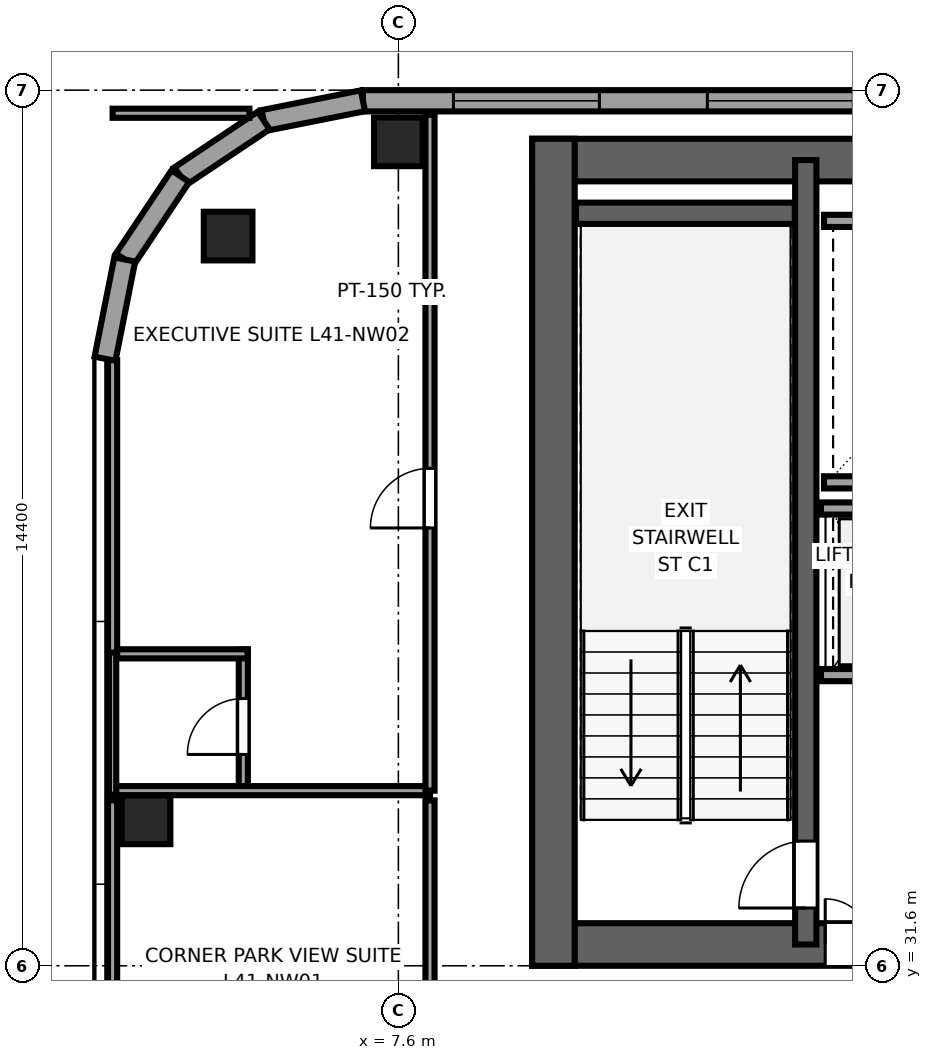
"""IFC4 building model, lengths in metres.
Left out: names, types, materials, properties, quantities, classifications, styles, units other than length and angle.
Written with IfcOpenShell. Run it as: python <this file> out.ifc"""

import sys

from ifc_helpers import new_model, si_unit, direction, frame, frame_2d, origin, origin_2d, place, context, subcontext, project, spatial, rectangle, extrude, source, transform, mapped, element, fill, save


model = new_model("IFC4")
c1 = context("Model", 3, precision=1e-05, world=origin(), true_north=direction((0.0, 1.0)))
c2 = subcontext(c1, "Body", "Model", "MODEL_VIEW")
j1 = project(units=[si_unit("LENGTHUNIT", "METRE"), si_unit("PLANEANGLEUNIT", "RADIAN")], contexts=[c1])
p1 = place(None, origin())
s1 = spatial("IfcSite", under=j1, at=p1, CompositionType="ELEMENT")
p2 = place(p1, origin())
s2 = spatial("IfcBuilding", under=s1, at=p2, CompositionType="ELEMENT")
p3 = place(p2, frame((0.0, 0.0, 157.7)))
s3 = spatial("IfcBuildingStorey", under=s2, at=p3, CompositionType="ELEMENT", Elevation=157.7)
p4 = place(p3, frame((9.8, 31.95, 0.0), z_axis=(0.0, 0.0, 1.0), x_axis=(1.0, 0.0, 0.0)))
e1 = element("IfcWall", 1, at=p4, inside=s3, PredefinedType="SHEAR", context=c2, shape_type="SweptSolid", body=[
    extrude(rectangle(XDim=26.4, YDim=0.7, at=frame_2d((13.2, 0.0))), origin(), (0.0, 0.0, 1.0), 3.55),
])
p5 = place(p4, frame((6.32, 0.0, 0.0), z_axis=(0.0, 0.0, 1.0), x_axis=(-1.0, 0.0, 0.0)))
e2 = element("IfcOpeningElement", 2, at=p5, cuts=e1, PredefinedType="OPENING", context=c2, shape_type="SweptSolid", body=[
    extrude(rectangle(XDim=1.5, YDim=2.04, at=frame_2d((0.75, 1.02))), frame((0.0, 0.36, 0.0), z_axis=(0.0, -1.0, 0.0), x_axis=(1.0, 0.0, 0.0)), (0.0, 0.0, 1.0), 0.72),
])
p6 = place(p4, frame((13.95, 0.0, 0.0), z_axis=(0.0, 0.0, 1.0), x_axis=(-1.0, 0.0, 0.0)))
e3 = element("IfcOpeningElement", 3, at=p6, cuts=e1, PredefinedType="OPENING", context=c2, shape_type="SweptSolid", body=[
    extrude(rectangle(XDim=1.5, YDim=2.04, at=frame_2d((0.75, 1.02))), frame((0.0, 0.36, 0.0), z_axis=(0.0, -1.0, 0.0), x_axis=(1.0, 0.0, 0.0)), (0.0, 0.0, 1.0), 0.72),
])
p7 = place(p4, frame((21.58, 0.0, 0.0), z_axis=(0.0, 0.0, 1.0), x_axis=(-1.0, 0.0, 0.0)))
e4 = element("IfcOpeningElement", 4, at=p7, cuts=e1, PredefinedType="OPENING", context=c2, shape_type="SweptSolid", body=[
    extrude(rectangle(XDim=1.5, YDim=2.04, at=frame_2d((0.75, 1.02))), frame((0.0, 0.36, 0.0), z_axis=(0.0, -1.0, 0.0), x_axis=(1.0, 0.0, 0.0)), (0.0, 0.0, 1.0), 0.72),
])
p8 = place(p4, frame((8.37, 0.0, 0.0), z_axis=(0.0, 0.0, 1.0), x_axis=(-1.0, 0.0, 0.0)))
e5 = element("IfcOpeningElement", 5, at=p8, cuts=e1, PredefinedType="OPENING", context=c2, shape_type="SweptSolid", body=[
    extrude(rectangle(XDim=0.82, YDim=2.01, at=frame_2d((0.41, 1.005))), frame((0.0, 0.36, 0.0), z_axis=(0.0, -1.0, 0.0), x_axis=(1.0, 0.0, 0.0)), (0.0, 0.0, 1.0), 0.72),
])
p9 = place(p4, frame((18.87, 0.0, 0.0), z_axis=(0.0, 0.0, 1.0), x_axis=(-1.0, 0.0, 0.0)))
e6 = element("IfcOpeningElement", 6, at=p9, cuts=e1, PredefinedType="OPENING", context=c2, shape_type="SweptSolid", body=[
    extrude(rectangle(XDim=0.82, YDim=2.01, at=frame_2d((0.41, 1.005))), frame((0.0, 0.36, 0.0), z_axis=(0.0, -1.0, 0.0), x_axis=(1.0, 0.0, 0.0)), (0.0, 0.0, 1.0), 0.72),
])
p10 = place(p3, frame((9.8, 44.85, 0.0), z_axis=(0.0, 0.0, 1.0), x_axis=(1.0, 0.0, 0.0)))
e7 = element("IfcWall", 7, at=p10, inside=s3, PredefinedType="SHEAR", context=c2, shape_type="SweptSolid", body=[
    extrude(rectangle(XDim=26.4, YDim=0.7, at=frame_2d((13.2, 0.0))), origin(), (0.0, 0.0, 1.0), 3.55),
])
p11 = place(p3, frame((10.15, 31.6, 0.0), z_axis=(0.0, 0.0, 1.0), x_axis=(0.0, 1.0, 0.0)))
e8 = element("IfcWall", 8, at=p11, inside=s3, PredefinedType="SHEAR", context=c2, shape_type="SweptSolid", body=[
    extrude(rectangle(XDim=13.6, YDim=0.7, at=frame_2d((6.8, 0.0))), origin(), (0.0, 0.0, 1.0), 3.55),
])
p12 = place(p3, frame((14.3, 31.95, 0.0), z_axis=(0.0, 0.0, 1.0), x_axis=(0.0, 1.0, 0.0)))
e9 = element("IfcWall", 9, at=p12, inside=s3, PredefinedType="SHEAR", context=c2, shape_type="SweptSolid", body=[
    extrude(rectangle(XDim=12.9, YDim=0.35, at=frame_2d((6.45, 0.0))), origin(), (0.0, 0.0, 1.0), 3.55),
])
p13 = place(p12, frame((0.6, 0.0, 0.0)))
e10 = element("IfcOpeningElement", 10, at=p13, cuts=e9, PredefinedType="OPENING", context=c2, shape_type="SweptSolid", body=[
    extrude(rectangle(XDim=1.1, YDim=2.12, at=frame_2d((0.55, 1.06))), frame((0.0, 0.185, 0.0), z_axis=(0.0, -1.0, 0.0), x_axis=(1.0, 0.0, 0.0)), (0.0, 0.0, 1.0), 0.37),
])
p14 = place(p3, frame((10.52, 43.975, 0.0), z_axis=(0.0, 0.0, 1.0), x_axis=(1.0, 0.0, 0.0)))
e11 = element("IfcWall", 11, at=p14, inside=s3, PredefinedType="SHEAR", context=c2, shape_type="SweptSolid", body=[
    extrude(rectangle(XDim=3.6, YDim=0.35, at=frame_2d((1.8, 0.0))), origin(), (0.0, 0.0, 1.0), 3.55),
])
m1 = source(origin(), c2, "Body", "SweptSolid", [
    extrude(rectangle(XDim=0.8, YDim=0.8, at=origin_2d()), origin(), (0.0, 0.0, 1.0), 3.55),
])
for number, where, z_axis, x_axis in (
    (12, (4.8, 43.6, 0.0), (0.0, 0.0, 1.0), (1.0, 0.0, 0.0)),
    (13, (7.6, 45.15, 0.0), (0.0, 0.0, 1.0), (1.0, 0.0, 0.0)),
    (14, (3.45, 34.0, 0.0), (0.0, 0.0, 1.0), (1.0, 0.0, 0.0)),
):
    element("IfcColumn", number, at=place(p3, frame(where, z_axis=z_axis, x_axis=x_axis)), inside=s3, PredefinedType="COLUMN", context=c2, shape_type="MappedRepresentation", body=[
        mapped(m1, transform((0.0, 0.0, 0.0), x_axis=(1.0, 0.0, 0.0), y_axis=(0.0, 1.0, 0.0), z_axis=(0.0, 0.0, 1.0), scale=1.0)),
    ])
p15 = place(p3, frame((49.983, 45.825, 0.0), z_axis=(0.0, 0.0, 1.0), x_axis=(-1.0, 0.0, 0.0)))
e15 = element("IfcWall", 15, at=p15, inside=s3, PredefinedType="SOLIDWALL", context=c2, shape_type="SweptSolid", body=[
    extrude(rectangle(XDim=42.966, YDim=0.35, at=frame_2d((21.483, 0.0))), origin(), (0.0, 0.0, 1.0), 3.37),
])
p16 = place(p15, frame((1.488, 0.0, 0.68)))
e16 = element("IfcOpeningElement", 16, at=p16, cuts=e15, PredefinedType="OPENING", context=c2, shape_type="SweptSolid", body=[
    extrude(rectangle(XDim=2.4, YDim=1.9, at=frame_2d((1.2, 0.95))), frame((0.0, 0.185, 0.0), z_axis=(0.0, -1.0, 0.0), x_axis=(1.0, 0.0, 0.0)), (0.0, 0.0, 1.0), 0.37),
])
p17 = place(p15, frame((9.841, 0.0, 0.68)))
e17 = element("IfcOpeningElement", 17, at=p17, cuts=e15, PredefinedType="OPENING", context=c2, shape_type="SweptSolid", body=[
    extrude(rectangle(XDim=2.4, YDim=1.9, at=frame_2d((1.2, 0.95))), frame((0.0, 0.185, 0.0), z_axis=(0.0, -1.0, 0.0), x_axis=(1.0, 0.0, 0.0)), (0.0, 0.0, 1.0), 0.37),
])
p18 = place(p15, frame((14.018, 0.0, 0.68)))
e18 = element("IfcOpeningElement", 18, at=p18, cuts=e15, PredefinedType="OPENING", context=c2, shape_type="SweptSolid", body=[
    extrude(rectangle(XDim=2.4, YDim=1.9, at=frame_2d((1.2, 0.95))), frame((0.0, 0.185, 0.0), z_axis=(0.0, -1.0, 0.0), x_axis=(1.0, 0.0, 0.0)), (0.0, 0.0, 1.0), 0.37),
])
p19 = place(p15, frame((18.195, 0.0, 0.68)))
e19 = element("IfcOpeningElement", 19, at=p19, cuts=e15, PredefinedType="OPENING", context=c2, shape_type="SweptSolid", body=[
    extrude(rectangle(XDim=2.4, YDim=1.9, at=frame_2d((1.2, 0.95))), frame((0.0, 0.185, 0.0), z_axis=(0.0, -1.0, 0.0), x_axis=(1.0, 0.0, 0.0)), (0.0, 0.0, 1.0), 0.37),
])
p20 = place(p15, frame((22.371, 0.0, 0.68)))
e20 = element("IfcOpeningElement", 20, at=p20, cuts=e15, PredefinedType="OPENING", context=c2, shape_type="SweptSolid", body=[
    extrude(rectangle(XDim=2.4, YDim=1.9, at=frame_2d((1.2, 0.95))), frame((0.0, 0.185, 0.0), z_axis=(0.0, -1.0, 0.0), x_axis=(1.0, 0.0, 0.0)), (0.0, 0.0, 1.0), 0.37),
])
p21 = place(p15, frame((26.548, 0.0, 0.68)))
e21 = element("IfcOpeningElement", 21, at=p21, cuts=e15, PredefinedType="OPENING", context=c2, shape_type="SweptSolid", body=[
    extrude(rectangle(XDim=2.4, YDim=1.9, at=frame_2d((1.2, 0.95))), frame((0.0, 0.185, 0.0), z_axis=(0.0, -1.0, 0.0), x_axis=(1.0, 0.0, 0.0)), (0.0, 0.0, 1.0), 0.37),
])
p22 = place(p15, frame((30.724, 0.0, 0.68)))
e22 = element("IfcOpeningElement", 22, at=p22, cuts=e15, PredefinedType="OPENING", context=c2, shape_type="SweptSolid", body=[
    extrude(rectangle(XDim=2.4, YDim=1.9, at=frame_2d((1.2, 0.95))), frame((0.0, 0.185, 0.0), z_axis=(0.0, -1.0, 0.0), x_axis=(1.0, 0.0, 0.0)), (0.0, 0.0, 1.0), 0.37),
])
p23 = place(p15, frame((34.901, 0.0, 0.68)))
e23 = element("IfcOpeningElement", 23, at=p23, cuts=e15, PredefinedType="OPENING", context=c2, shape_type="SweptSolid", body=[
    extrude(rectangle(XDim=2.4, YDim=1.9, at=frame_2d((1.2, 0.95))), frame((0.0, 0.185, 0.0), z_axis=(0.0, -1.0, 0.0), x_axis=(1.0, 0.0, 0.0)), (0.0, 0.0, 1.0), 0.37),
])
p24 = place(p15, frame((39.077, 0.0, 0.68)))
e24 = element("IfcOpeningElement", 24, at=p24, cuts=e15, PredefinedType="OPENING", context=c2, shape_type="SweptSolid", body=[
    extrude(rectangle(XDim=2.4, YDim=1.9, at=frame_2d((1.2, 0.95))), frame((0.0, 0.185, 0.0), z_axis=(0.0, -1.0, 0.0), x_axis=(1.0, 0.0, 0.0)), (0.0, 0.0, 1.0), 0.37),
])
p25 = place(p3, frame((7.017, 45.825, 0.0), z_axis=(0.0, 0.0, 1.0), x_axis=(-0.980788844421, -0.195072403631, 0.0)))
e25 = element("IfcWall", 25, at=p25, inside=s3, PredefinedType="SOLIDWALL", context=c2, shape_type="SweptSolid", body=[
    extrude(rectangle(XDim=1.665, YDim=0.35, at=frame_2d((0.832, 0.0))), origin(), (0.0, 0.0, 1.0), 3.37),
])
for number, where, z_axis, x_axis in (
    (26, (5.385, 45.5, 0.0), (0.0, 0.0, 1.0), (-0.832, -0.556, 0.0)),
    (27, (4.015, 44.585, 0.0), (0.0, 0.0, 1.0), (-0.556, -0.831, 0.0)),
):
    element("IfcWall", number, at=place(p3, frame(where, z_axis=z_axis, x_axis=x_axis)), inside=s3, PredefinedType="SOLIDWALL", context=c2, shape_type="SweptSolid", body=[
        extrude(rectangle(XDim=1.647, YDim=0.35, at=frame_2d((0.824, 0.0))), origin(), (0.0, 0.0, 1.0), 2.832),
    ])
p26 = place(p3, frame((3.1, 43.216, 0.0), z_axis=(0.0, 0.0, 1.0), x_axis=(-0.195044345786, -0.980794424524, 0.0)))
e28 = element("IfcWall", 28, at=p26, inside=s3, PredefinedType="SOLIDWALL", context=c2, shape_type="SweptSolid", body=[
    extrude(rectangle(XDim=1.665, YDim=0.35, at=frame_2d((0.833, 0.0))), origin(), (0.0, 0.0, 1.0), 3.37),
])
for number, where, z_axis, x_axis in (
    (29, (14.6, 39.55, 0.0), (0.0, 0.0, 1.0), (1.0, 0.0, 0.0)),
    (30, (14.6, 43.85, 0.0), (0.0, 0.0, 1.0), (1.0, 0.0, 0.0)),
):
    element("IfcWall", number, at=place(p3, frame(where, z_axis=z_axis, x_axis=x_axis)), inside=s3, PredefinedType="SOLIDWALL", context=c2, shape_type="SweptSolid", body=[
        extrude(rectangle(XDim=4.1, YDim=0.2, at=frame_2d((2.05, 0.0))), origin(), (0.0, 0.0, 1.0), 3.37),
    ])
p27 = place(p3, frame((14.55, 36.38, 0.0), z_axis=(0.0, 0.0, 1.0), x_axis=(1.0, 0.0, 0.0)))
e31 = element("IfcWall", 31, at=p27, inside=s3, PredefinedType="SOLIDWALL", context=c2, shape_type="SweptSolid", body=[
    extrude(rectangle(XDim=4.075, YDim=0.2, at=frame_2d((2.038, 0.0))), origin(), (0.0, 0.0, 1.0), 3.37),
])
p28 = place(p27, frame((0.55, 0.0, 0.0)))
e32 = element("IfcOpeningElement", 32, at=p28, cuts=e31, PredefinedType="OPENING", context=c2, shape_type="SweptSolid", body=[
    extrude(rectangle(XDim=1.1, YDim=2.12, at=frame_2d((0.55, 1.06))), frame((0.0, 0.11, 0.0), z_axis=(0.0, -1.0, 0.0), x_axis=(1.0, 0.0, 0.0)), (0.0, 0.0, 1.0), 0.22),
])
p29 = place(p27, frame((2.45, 0.0, 0.0)))
e33 = element("IfcOpeningElement", 33, at=p29, cuts=e31, PredefinedType="OPENING", context=c2, shape_type="SweptSolid", body=[
    extrude(rectangle(XDim=1.1, YDim=2.12, at=frame_2d((0.55, 1.06))), frame((0.0, 0.11, 0.0), z_axis=(0.0, -1.0, 0.0), x_axis=(1.0, 0.0, 0.0)), (0.0, 0.0, 1.0), 0.22),
])
p30 = place(p3, frame((14.55, 39.12, 0.0), z_axis=(0.0, 0.0, 1.0), x_axis=(1.0, 0.0, 0.0)))
e34 = element("IfcWall", 34, at=p30, inside=s3, PredefinedType="SOLIDWALL", context=c2, shape_type="SweptSolid", body=[
    extrude(rectangle(XDim=4.075, YDim=0.2, at=frame_2d((2.038, 0.0))), origin(), (0.0, 0.0, 1.0), 3.37),
])
p31 = place(p3, frame((5.05, 34.41, 0.0), z_axis=(0.0, 0.0, 1.0), x_axis=(0.0, 1.0, 0.0)))
e35 = element("IfcWall", 35, at=p31, inside=s3, PredefinedType="PARTITIONING", context=c2, shape_type="SweptSolid", body=[
    extrude(rectangle(XDim=2.39, YDim=0.15, at=frame_2d((1.195, 0.0))), origin(), (0.0, 0.0, 1.0), 3.37),
])
p32 = place(p31, frame((0.665, 0.0, 0.0)))
e36 = element("IfcOpeningElement", 36, at=p32, cuts=e35, PredefinedType="OPENING", context=c2, shape_type="SweptSolid", body=[
    extrude(rectangle(XDim=0.92, YDim=2.01, at=frame_2d((0.46, 1.005))), frame((0.0, 0.085, 0.0), z_axis=(0.0, -1.0, 0.0), x_axis=(1.0, 0.0, 0.0)), (0.0, 0.0, 1.0), 0.17),
])
p33 = place(p3, frame((2.83, 34.48, 0.0), z_axis=(0.0, 0.0, 1.0), x_axis=(1.0, 0.0, 0.0)))
e37 = element("IfcWall", 37, at=p33, inside=s3, PredefinedType="PARTITIONING", context=c2, shape_type="SweptSolid", body=[
    extrude(rectangle(XDim=5.29, YDim=0.15, at=frame_2d((2.645, 0.0))), origin(), (0.0, 0.0, 1.0), 3.37),
])
p34 = place(p3, frame((2.83, 36.73, 0.0), z_axis=(0.0, 0.0, 1.0), x_axis=(1.0, 0.0, 0.0)))
e38 = element("IfcWall", 38, at=p34, inside=s3, PredefinedType="PARTITIONING", context=c2, shape_type="SweptSolid", body=[
    extrude(rectangle(XDim=2.29, YDim=0.15, at=frame_2d((1.145, 0.0))), origin(), (0.0, 0.0, 1.0), 3.37),
])
p35 = place(p3, frame((2.9, 34.41, 0.0), z_axis=(0.0, 0.0, 1.0), x_axis=(0.0, 1.0, 0.0)))
e39 = element("IfcWall", 39, at=p35, inside=s3, PredefinedType="PLUMBINGWALL", context=c2, shape_type="SweptSolid", body=[
    extrude(rectangle(XDim=2.39, YDim=0.12, at=frame_2d((1.195, 0.0))), origin(), (0.0, 0.0, 1.0), 3.37),
])
p36 = place(p3, frame((8.12, 23.58, 0.0), z_axis=(0.0, 0.0, 1.0), x_axis=(0.0, 1.0, 0.0)))
e40 = element("IfcWall", 40, at=p36, inside=s3, PredefinedType="PARTITIONING", context=c2, shape_type="SweptSolid", body=[
    extrude(rectangle(XDim=10.74, YDim=0.15, at=frame_2d((5.37, 0.0))), origin(), (0.0, 0.0, 1.0), 3.37),
])
p37 = place(p36, frame((4.88, 0.0, 0.0)))
e41 = element("IfcOpeningElement", 41, at=p37, cuts=e40, PredefinedType="OPENING", context=c2, shape_type="SweptSolid", body=[
    extrude(rectangle(XDim=0.98, YDim=2.12, at=frame_2d((0.49, 1.06))), frame((0.0, 0.085, 0.0), z_axis=(0.0, -1.0, 0.0), x_axis=(1.0, 0.0, 0.0)), (0.0, 0.0, 1.0), 0.17),
])
p38 = place(p3, frame((2.9, 25.83, 0.0), z_axis=(0.0, 0.0, 1.0), x_axis=(0.0, 1.0, 0.0)))
e42 = element("IfcWall", 42, at=p38, inside=s3, PredefinedType="PARTITIONING", context=c2, shape_type="SweptSolid", body=[
    extrude(rectangle(XDim=8.49, YDim=0.15, at=frame_2d((4.245, 0.0))), origin(), (0.0, 0.0, 1.0), 3.37),
])
p39 = place(p3, frame((8.12, 34.48, 0.0), z_axis=(0.0, 0.0, 1.0), x_axis=(0.0, 1.0, 0.0)))
e43 = element("IfcWall", 43, at=p39, inside=s3, PredefinedType="PARTITIONING", context=c2, shape_type="SweptSolid", body=[
    extrude(rectangle(XDim=11.115, YDim=0.15, at=frame_2d((5.558, 0.0))), origin(), (0.0, 0.0, 1.0), 3.37),
])
p40 = place(p39, frame((4.32, 0.0, 0.0)))
e44 = element("IfcOpeningElement", 44, at=p40, cuts=e43, PredefinedType="OPENING", context=c2, shape_type="SweptSolid", body=[
    extrude(rectangle(XDim=0.98, YDim=2.12, at=frame_2d((0.49, 1.06))), frame((0.0, 0.085, 0.0), z_axis=(0.0, -1.0, 0.0), x_axis=(1.0, 0.0, 0.0)), (0.0, 0.0, 1.0), 0.17),
])
p41 = place(p3, frame((2.9, 45.62, 0.0), z_axis=(0.0, 0.0, 1.0), x_axis=(1.0, 0.0, 0.0)))
e45 = element("IfcWall", 45, at=p41, inside=s3, PredefinedType="PARTITIONING", context=c2, shape_type="SweptSolid", body=[
    extrude(rectangle(XDim=2.25, YDim=0.15, at=frame_2d((1.125, 0.0))), origin(), (0.0, 0.0, 1.0), 3.37),
])
p42 = place(p3, frame((2.9, 36.75, 0.0), z_axis=(0.0, 0.0, 1.0), x_axis=(0.0, 1.0, 0.0)))
e46 = element("IfcWall", 46, at=p42, inside=s3, PredefinedType="PARTITIONING", context=c2, shape_type="SweptSolid", body=[
    extrude(rectangle(XDim=4.808, YDim=0.15, at=frame_2d((2.404, 0.0))), origin(), (0.0, 0.0, 1.0), 3.37),
])
m2 = source(origin(), c2, "Body", "SweptSolid", [
    extrude(rectangle(XDim=2.4, YDim=1.9, at=frame_2d((1.2, 0.95))), frame((0.0, 0.09, 0.0), z_axis=(0.0, -1.0, 0.0), x_axis=(1.0, 0.0, 0.0)), (0.0, 0.0, 1.0), 0.06),
])
p43 = place(p23, origin())
e47 = element("IfcWindow", 47, at=p43, inside=s3, PartitioningType="TRIPLE_PANEL_HORIZONTAL", PredefinedType="WINDOW", context=c2, shape_type="MappedRepresentation", body=[
    mapped(m2, transform((0.0, 0.0, 0.0), x_axis=(1.0, 0.0, 0.0), y_axis=(0.0, 1.0, 0.0), z_axis=(0.0, 0.0, 1.0), scale=1.0)),
])
fill(e23, e47)
p44 = place(p24, origin())
e48 = element("IfcWindow", 48, at=p44, inside=s3, PartitioningType="TRIPLE_PANEL_HORIZONTAL", PredefinedType="WINDOW", context=c2, shape_type="MappedRepresentation", body=[
    mapped(m2, transform((0.0, 0.0, 0.0), x_axis=(1.0, 0.0, 0.0), y_axis=(0.0, 1.0, 0.0), z_axis=(0.0, 0.0, 1.0), scale=1.0)),
])
fill(e24, e48)
m3 = source(origin(), c2, "Body", "SweptSolid", [
    extrude(rectangle(XDim=1.1, YDim=2.12, at=frame_2d((0.55, 1.06))), frame((0.0, 0.025, 0.0), z_axis=(0.0, -1.0, 0.0), x_axis=(1.0, 0.0, 0.0)), (0.0, 0.0, 1.0), 0.05),
])
p45 = place(p13, origin())
e49 = element("IfcDoor", 49, at=p45, inside=s3, OperationType="SINGLE_SWING_LEFT", PredefinedType="DOOR", context=c2, shape_type="MappedRepresentation", body=[
    mapped(m3, transform((0.0, 0.0, 0.0), x_axis=(1.0, 0.0, 0.0), y_axis=(0.0, 1.0, 0.0), z_axis=(0.0, 0.0, 1.0), scale=1.0)),
])
fill(e10, e49)
m4 = source(origin(), c2, "Body", "SweptSolid", [
    extrude(rectangle(XDim=1.5, YDim=2.04, at=frame_2d((0.75, 1.02))), frame((0.0, 0.025, 0.0), z_axis=(0.0, -1.0, 0.0), x_axis=(1.0, 0.0, 0.0)), (0.0, 0.0, 1.0), 0.05),
])
p46 = place(p5, origin())
e50 = element("IfcDoor", 50, at=p46, inside=s3, OperationType="DOUBLE_DOOR_SINGLE_SWING", PredefinedType="DOOR", context=c2, shape_type="MappedRepresentation", body=[
    mapped(m4, transform((0.0, 0.0, 0.0), x_axis=(1.0, 0.0, 0.0), y_axis=(0.0, 1.0, 0.0), z_axis=(0.0, 0.0, 1.0), scale=1.0)),
])
fill(e2, e50)
m5 = source(origin(), c2, "Body", "SweptSolid", [
    extrude(rectangle(XDim=0.92, YDim=2.01, at=frame_2d((0.46, 1.005))), frame((0.0, 0.025, 0.0), z_axis=(0.0, -1.0, 0.0), x_axis=(1.0, 0.0, 0.0)), (0.0, 0.0, 1.0), 0.05),
])
p47 = place(p32, origin())
e51 = element("IfcDoor", 51, at=p47, inside=s3, OperationType="SINGLE_SWING_LEFT", PredefinedType="DOOR", context=c2, shape_type="MappedRepresentation", body=[
    mapped(m5, transform((0.0, 0.0, 0.0), x_axis=(1.0, 0.0, 0.0), y_axis=(0.0, 1.0, 0.0), z_axis=(0.0, 0.0, 1.0), scale=1.0)),
])
fill(e36, e51)
m6 = source(origin(), c2, "Body", "SweptSolid", [
    extrude(rectangle(XDim=0.98, YDim=2.12, at=frame_2d((0.49, 1.06))), frame((0.0, 0.025, 0.0), z_axis=(0.0, -1.0, 0.0), x_axis=(1.0, 0.0, 0.0)), (0.0, 0.0, 1.0), 0.05),
])
p48 = place(p40, origin())
e52 = element("IfcDoor", 52, at=p48, inside=s3, OperationType="SINGLE_SWING_LEFT", PredefinedType="DOOR", context=c2, shape_type="MappedRepresentation", body=[
    mapped(m6, transform((0.0, 0.0, 0.0), x_axis=(1.0, 0.0, 0.0), y_axis=(0.0, 1.0, 0.0), z_axis=(0.0, 0.0, 1.0), scale=1.0)),
])
fill(e44, e52)
save(model, sys.argv[1])
